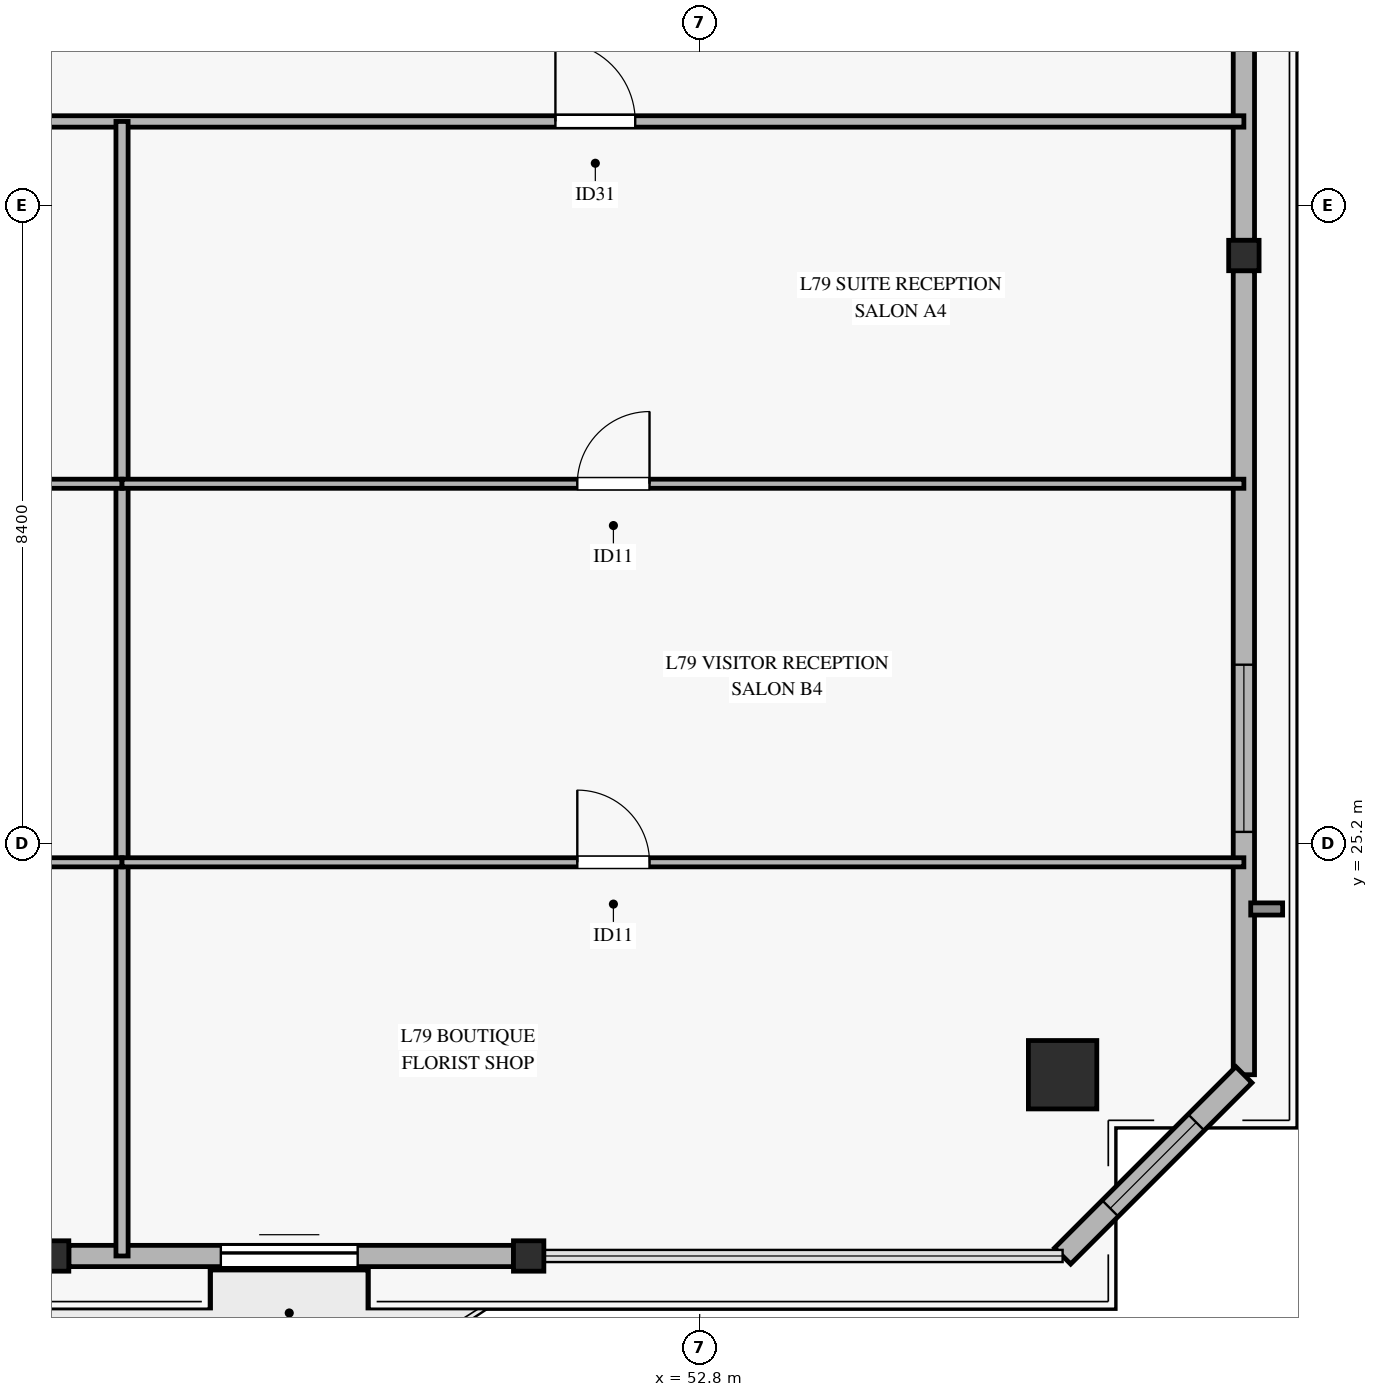
"""IFC4 building model, lengths in metres.
Left out: names, types, materials, properties, quantities, classifications, styles, units other than length and angle.
Written with IfcOpenShell. Run it as: python <this file> out.ifc"""

import sys

from ifc_helpers import new_model, si_unit, direction, frame, frame_2d, origin, origin_2d, place, context, subcontext, project, spatial, rectangle, hollow_rectangle, extrude, source, transform, mapped, element, fill, save


model = new_model("IFC4")
c1 = context("Model", 3, precision=1e-05, world=origin(), true_north=direction((0.0, 1.0)))
c2 = subcontext(c1, "Body", "Model", "MODEL_VIEW")
j1 = project(units=[si_unit("LENGTHUNIT", "METRE"), si_unit("PLANEANGLEUNIT", "RADIAN")], contexts=[c1])
p1 = place(None, origin())
s1 = spatial("IfcSite", under=j1, at=p1, CompositionType="ELEMENT")
p2 = place(p1, origin())
s2 = spatial("IfcBuilding", under=s1, at=p2, CompositionType="ELEMENT")
p3 = place(p2, frame((0.0, 0.0, 307.4)))
s3 = spatial("IfcBuildingStorey", under=s2, at=p3, CompositionType="ELEMENT", Elevation=307.4)
m1 = source(origin(), c2, "Body", "SweptSolid", [
    extrude(hollow_rectangle(XDim=0.9, YDim=0.9, WallThickness=0.04, at=origin_2d()), origin(), (0.0, 0.0, 1.0), 3.185),
])
p4 = place(p3, frame((57.575, 22.157, 0.0), z_axis=(0.0, 0.0, 1.0), x_axis=(1.0, 0.0, 0.0)))
e1 = element("IfcColumn", 1, at=p4, inside=s3, PredefinedType="COLUMN", context=c2, shape_type="MappedRepresentation", body=[
    mapped(m1, transform((0.0, 0.0, 0.0), x_axis=(1.0, 0.0, 0.0), y_axis=(0.0, 1.0, 0.0), z_axis=(0.0, 0.0, 1.0), scale=1.0)),
])
m2 = source(origin(), c2, "Body", "SweptSolid", [
    extrude(hollow_rectangle(XDim=0.4, YDim=0.4, WallThickness=0.02, at=origin_2d()), origin(), (0.0, 0.0, 1.0), 3.185),
])
for number, where, z_axis, x_axis in (
    (2, (44.3, 19.772, 0.0), (0.0, 0.0, 1.0), (1.0, 0.0, 0.0)),
    (3, (50.55, 19.772, 0.0), (0.0, 0.0, 1.0), (1.0, 0.0, 0.0)),
    (4, (59.96, 32.936, 0.0), (0.0, 0.0, 1.0), (1.0, 0.0, 0.0)),
):
    element("IfcColumn", number, at=place(p3, frame(where, z_axis=z_axis, x_axis=x_axis)), inside=s3, PredefinedType="COLUMN", context=c2, shape_type="MappedRepresentation", body=[
        mapped(m2, transform((0.0, 0.0, 0.0), x_axis=(1.0, 0.0, 0.0), y_axis=(0.0, 1.0, 0.0), z_axis=(0.0, 0.0, 1.0), scale=1.0)),
    ])
p5 = place(p3, frame((44.5, 19.772, 0.0), z_axis=(0.0, 0.0, 1.0), x_axis=(1.0, 0.0, 0.0)))
e5 = element("IfcWall", 5, at=p5, inside=s3, PredefinedType="SOLIDWALL", context=c2, shape_type="SweptSolid", body=[
    extrude(rectangle(XDim=5.85, YDim=0.28, at=frame_2d((2.925, 0.0))), origin(), (0.0, 0.0, 1.0), 2.815),
])
p6 = place(p5, frame((2.0, 0.0, 0.0)))
e6 = element("IfcOpeningElement", 6, at=p6, cuts=e5, PredefinedType="OPENING", context=c2, shape_type="SweptSolid", body=[
    extrude(rectangle(XDim=1.8, YDim=2.25, at=frame_2d((0.9, 1.125))), frame((0.0, 0.15, 0.0), z_axis=(0.0, -1.0, 0.0), x_axis=(1.0, 0.0, 0.0)), (0.0, 0.0, 1.0), 0.3),
])
p7 = place(p3, frame((59.96, 22.157, 0.0), z_axis=(0.0, 0.0, 1.0), x_axis=(0.0, 1.0, 0.0)))
e7 = element("IfcWall", 7, at=p7, inside=s3, PredefinedType="SOLIDWALL", context=c2, shape_type="SweptSolid", body=[
    extrude(rectangle(XDim=10.579, YDim=0.28, at=frame_2d((5.29, 0.0))), origin(), (0.0, 0.0, 1.0), 2.815),
])
p8 = place(p7, frame((3.195, 0.0, 0.45)))
e8 = element("IfcOpeningElement", 8, at=p8, cuts=e7, PredefinedType="OPENING", context=c2, shape_type="SweptSolid", body=[
    extrude(rectangle(XDim=2.2, YDim=2.1, at=frame_2d((1.1, 1.05))), frame((0.0, 0.15, 0.0), z_axis=(0.0, -1.0, 0.0), x_axis=(1.0, 0.0, 0.0)), (0.0, 0.0, 1.0), 0.3),
])
p9 = place(p3, frame((59.96, 33.136, 0.0), z_axis=(0.0, 0.0, 1.0), x_axis=(0.0, 1.0, 0.0)))
e9 = element("IfcWall", 9, at=p9, inside=s3, PredefinedType="SOLIDWALL", context=c2, shape_type="SweptSolid", body=[
    extrude(rectangle(XDim=10.579, YDim=0.28, at=frame_2d((5.29, 0.0))), origin(), (0.0, 0.0, 1.0), 2.815),
])
p10 = place(p9, frame((6.102, 0.0, 0.45)))
e10 = element("IfcOpeningElement", 10, at=p10, cuts=e9, PredefinedType="OPENING", context=c2, shape_type="SweptSolid", body=[
    extrude(rectangle(XDim=2.2, YDim=2.1, at=frame_2d((1.1, 1.05))), frame((0.0, 0.15, 0.0), z_axis=(0.0, -1.0, 0.0), x_axis=(1.0, 0.0, 0.0)), (0.0, 0.0, 1.0), 0.3),
])
p11 = place(p3, frame((57.575, 19.772, 0.0), z_axis=(0.0, 0.0, 1.0), x_axis=(0.707106781187, 0.707106781187, 0.0)))
e11 = element("IfcWall", 11, at=p11, inside=s3, PredefinedType="SOLIDWALL", context=c2, shape_type="SweptSolid", body=[
    extrude(rectangle(XDim=3.373, YDim=0.3, at=frame_2d((1.687, 0.0))), origin(), (0.0, 0.0, 1.0), 2.815),
])
p12 = place(p11, frame((0.886, 0.0, 0.45)))
e12 = element("IfcOpeningElement", 12, at=p12, cuts=e11, PredefinedType="OPENING", context=c2, shape_type="SweptSolid", body=[
    extrude(rectangle(XDim=1.6, YDim=2.0, at=frame_2d((0.8, 1.0))), frame((0.0, 0.16, 0.0), z_axis=(0.0, -1.0, 0.0), x_axis=(1.0, 0.0, 0.0)), (0.0, 0.0, 1.0), 0.32),
])
p13 = place(p3, frame((10.44, 34.7, 0.0), z_axis=(0.0, 0.0, 1.0), x_axis=(1.0, 0.0, 0.0)))
e13 = element("IfcWall", 13, at=p13, inside=s3, PredefinedType="PARTITIONING", context=c2, shape_type="SweptSolid", body=[
    extrude(rectangle(XDim=49.52, YDim=0.15, at=frame_2d((24.76, 0.0))), origin(), (0.0, 0.0, 1.0), 2.47),
])
p14 = place(p13, frame((4.382, 0.0, 0.0)))
e14 = element("IfcOpeningElement", 14, at=p14, cuts=e13, PredefinedType="OPENING", context=c2, shape_type="SweptSolid", body=[
    extrude(rectangle(XDim=1.05, YDim=2.15, at=frame_2d((0.525, 1.075))), frame((0.0, 0.085, 0.0), z_axis=(0.0, -1.0, 0.0), x_axis=(1.0, 0.0, 0.0)), (0.0, 0.0, 1.0), 0.17),
])
p15 = place(p13, frame((15.945, 0.0, 0.0)))
e15 = element("IfcOpeningElement", 15, at=p15, cuts=e13, PredefinedType="OPENING", context=c2, shape_type="SweptSolid", body=[
    extrude(rectangle(XDim=1.05, YDim=2.15, at=frame_2d((0.525, 1.075))), frame((0.0, 0.085, 0.0), z_axis=(0.0, -1.0, 0.0), x_axis=(1.0, 0.0, 0.0)), (0.0, 0.0, 1.0), 0.17),
])
p16 = place(p13, frame((28.233, 0.0, 0.0)))
e16 = element("IfcOpeningElement", 16, at=p16, cuts=e13, PredefinedType="OPENING", context=c2, shape_type="SweptSolid", body=[
    extrude(rectangle(XDim=1.05, YDim=2.15, at=frame_2d((0.525, 1.075))), frame((0.0, 0.085, 0.0), z_axis=(0.0, -1.0, 0.0), x_axis=(1.0, 0.0, 0.0)), (0.0, 0.0, 1.0), 0.17),
])
p17 = place(p13, frame((40.462, 0.0, 0.0)))
e17 = element("IfcOpeningElement", 17, at=p17, cuts=e13, PredefinedType="OPENING", context=c2, shape_type="SweptSolid", body=[
    extrude(rectangle(XDim=1.05, YDim=2.15, at=frame_2d((0.525, 1.075))), frame((0.0, 0.085, 0.0), z_axis=(0.0, -1.0, 0.0), x_axis=(1.0, 0.0, 0.0)), (0.0, 0.0, 1.0), 0.17),
])
p18 = place(p3, frame((45.2, 19.772, 0.0), z_axis=(0.0, 0.0, 1.0), x_axis=(0.0, 1.0, 0.0)))
e18 = element("IfcWall", 18, at=p18, inside=s3, PredefinedType="PARTITIONING", context=c2, shape_type="SweptSolid", body=[
    extrude(rectangle(XDim=14.928, YDim=0.16, at=frame_2d((7.464, 0.0))), origin(), (0.0, 0.0, 1.0), 2.77),
])
p19 = place(p3, frame((34.4, 24.952, 0.0), z_axis=(0.0, 0.0, 1.0), x_axis=(1.0, 0.0, 0.0)))
e19 = element("IfcWall", 19, at=p19, inside=s3, PredefinedType="PARTITIONING", context=c2, shape_type="SweptSolid", body=[
    extrude(rectangle(XDim=10.8, YDim=0.12, at=frame_2d((5.4, 0.0))), origin(), (0.0, 0.0, 1.0), 2.47),
])
p20 = place(p19, frame((4.486, 0.0, 0.0)))
e20 = element("IfcOpeningElement", 20, at=p20, cuts=e19, PredefinedType="OPENING", context=c2, shape_type="SweptSolid", body=[
    extrude(rectangle(XDim=0.95, YDim=2.1, at=frame_2d((0.475, 1.05))), frame((0.0, 0.07, 0.0), z_axis=(0.0, -1.0, 0.0), x_axis=(1.0, 0.0, 0.0)), (0.0, 0.0, 1.0), 0.14),
])
p21 = place(p3, frame((34.4, 29.933, 0.0), z_axis=(0.0, 0.0, 1.0), x_axis=(1.0, 0.0, 0.0)))
e21 = element("IfcWall", 21, at=p21, inside=s3, PredefinedType="PARTITIONING", context=c2, shape_type="SweptSolid", body=[
    extrude(rectangle(XDim=10.8, YDim=0.12, at=frame_2d((5.4, 0.0))), origin(), (0.0, 0.0, 1.0), 2.47),
])
p22 = place(p21, frame((4.486, 0.0, 0.0)))
e22 = element("IfcOpeningElement", 22, at=p22, cuts=e21, PredefinedType="OPENING", context=c2, shape_type="SweptSolid", body=[
    extrude(rectangle(XDim=0.95, YDim=2.1, at=frame_2d((0.475, 1.05))), frame((0.0, 0.07, 0.0), z_axis=(0.0, -1.0, 0.0), x_axis=(1.0, 0.0, 0.0)), (0.0, 0.0, 1.0), 0.14),
])
p23 = place(p3, frame((45.2, 24.952, 0.0), z_axis=(0.0, 0.0, 1.0), x_axis=(1.0, 0.0, 0.0)))
e23 = element("IfcWall", 23, at=p23, inside=s3, PredefinedType="PARTITIONING", context=c2, shape_type="SweptSolid", body=[
    extrude(rectangle(XDim=14.76, YDim=0.12, at=frame_2d((7.38, 0.0))), origin(), (0.0, 0.0, 1.0), 2.47),
])
p24 = place(p23, frame((5.99, 0.0, 0.0)))
e24 = element("IfcOpeningElement", 24, at=p24, cuts=e23, PredefinedType="OPENING", context=c2, shape_type="SweptSolid", body=[
    extrude(rectangle(XDim=0.95, YDim=2.1, at=frame_2d((0.475, 1.05))), frame((0.0, 0.07, 0.0), z_axis=(0.0, -1.0, 0.0), x_axis=(1.0, 0.0, 0.0)), (0.0, 0.0, 1.0), 0.14),
])
p25 = place(p3, frame((45.2, 29.933, 0.0), z_axis=(0.0, 0.0, 1.0), x_axis=(1.0, 0.0, 0.0)))
e25 = element("IfcWall", 25, at=p25, inside=s3, PredefinedType="PARTITIONING", context=c2, shape_type="SweptSolid", body=[
    extrude(rectangle(XDim=14.76, YDim=0.12, at=frame_2d((7.38, 0.0))), origin(), (0.0, 0.0, 1.0), 2.47),
])
p26 = place(p25, frame((5.99, 0.0, 0.0)))
e26 = element("IfcOpeningElement", 26, at=p26, cuts=e25, PredefinedType="OPENING", context=c2, shape_type="SweptSolid", body=[
    extrude(rectangle(XDim=0.95, YDim=2.1, at=frame_2d((0.475, 1.05))), frame((0.0, 0.07, 0.0), z_axis=(0.0, -1.0, 0.0), x_axis=(1.0, 0.0, 0.0)), (0.0, 0.0, 1.0), 0.14),
])
m3 = source(origin(), c2, "Body", "SweptSolid", [
    extrude(rectangle(XDim=1.8, YDim=2.25, at=frame_2d((0.9, 1.125))), frame((0.0, 0.025, 0.0), z_axis=(0.0, -1.0, 0.0), x_axis=(1.0, 0.0, 0.0)), (0.0, 0.0, 1.0), 0.05),
])
p27 = place(p6, origin())
e27 = element("IfcDoor", 27, at=p27, inside=s3, OperationType="SLIDING_TO_LEFT", PredefinedType="DOOR", context=c2, shape_type="MappedRepresentation", body=[
    mapped(m3, transform((0.0, 0.0, 0.0), x_axis=(1.0, 0.0, 0.0), y_axis=(0.0, 1.0, 0.0), z_axis=(0.0, 0.0, 1.0), scale=1.0)),
])
fill(e6, e27)
m4 = source(origin(), c2, "Body", "SweptSolid", [
    extrude(rectangle(XDim=2.2, YDim=2.1, at=frame_2d((1.1, 1.05))), frame((0.0, 0.03, 0.0), z_axis=(0.0, -1.0, 0.0), x_axis=(1.0, 0.0, 0.0)), (0.0, 0.0, 1.0), 0.06),
])
p28 = place(p8, origin())
e28 = element("IfcWindow", 28, at=p28, inside=s3, PartitioningType="SINGLE_PANEL", PredefinedType="WINDOW", context=c2, shape_type="MappedRepresentation", body=[
    mapped(m4, transform((0.0, 0.0, 0.0), x_axis=(1.0, 0.0, 0.0), y_axis=(0.0, 1.0, 0.0), z_axis=(0.0, 0.0, 1.0), scale=1.0)),
])
fill(e8, e28)
m5 = source(origin(), c2, "Body", "SweptSolid", [
    extrude(rectangle(XDim=1.6, YDim=2.0, at=frame_2d((0.8, 1.0))), frame((0.0, 0.03, 0.0), z_axis=(0.0, -1.0, 0.0), x_axis=(1.0, 0.0, 0.0)), (0.0, 0.0, 1.0), 0.06),
])
p29 = place(p12, origin())
e29 = element("IfcWindow", 29, at=p29, inside=s3, PartitioningType="SINGLE_PANEL", PredefinedType="WINDOW", context=c2, shape_type="MappedRepresentation", body=[
    mapped(m5, transform((0.0, 0.0, 0.0), x_axis=(1.0, 0.0, 0.0), y_axis=(0.0, 1.0, 0.0), z_axis=(0.0, 0.0, 1.0), scale=1.0)),
])
fill(e12, e29)
m6 = source(origin(), c2, "Body", "SweptSolid", [
    extrude(rectangle(XDim=1.05, YDim=2.15, at=frame_2d((0.525, 1.075))), frame((0.0, 0.025, 0.0), z_axis=(0.0, -1.0, 0.0), x_axis=(1.0, 0.0, 0.0)), (0.0, 0.0, 1.0), 0.05),
])
p30 = place(p17, origin())
e30 = element("IfcDoor", 30, at=p30, inside=s3, OperationType="SINGLE_SWING_LEFT", PredefinedType="DOOR", context=c2, shape_type="MappedRepresentation", body=[
    mapped(m6, transform((0.0, 0.0, 0.0), x_axis=(1.0, 0.0, 0.0), y_axis=(0.0, 1.0, 0.0), z_axis=(0.0, 0.0, 1.0), scale=1.0)),
])
fill(e17, e30)
m7 = source(origin(), c2, "Body", "SweptSolid", [
    extrude(rectangle(XDim=0.95, YDim=2.1, at=frame_2d((0.475, 1.05))), frame((0.0, 0.025, 0.0), z_axis=(0.0, -1.0, 0.0), x_axis=(1.0, 0.0, 0.0)), (0.0, 0.0, 1.0), 0.05),
])
p31 = place(p26, origin())
e31 = element("IfcDoor", 31, at=p31, inside=s3, OperationType="SINGLE_SWING_RIGHT", PredefinedType="DOOR", context=c2, shape_type="MappedRepresentation", body=[
    mapped(m7, transform((0.0, 0.0, 0.0), x_axis=(1.0, 0.0, 0.0), y_axis=(0.0, 1.0, 0.0), z_axis=(0.0, 0.0, 1.0), scale=1.0)),
])
fill(e26, e31)
p32 = place(p24, origin())
e32 = element("IfcDoor", 32, at=p32, inside=s3, OperationType="SINGLE_SWING_LEFT", PredefinedType="DOOR", context=c2, shape_type="MappedRepresentation", body=[
    mapped(m7, transform((0.0, 0.0, 0.0), x_axis=(1.0, 0.0, 0.0), y_axis=(0.0, 1.0, 0.0), z_axis=(0.0, 0.0, 1.0), scale=1.0)),
])
fill(e24, e32)
save(model, sys.argv[1])
